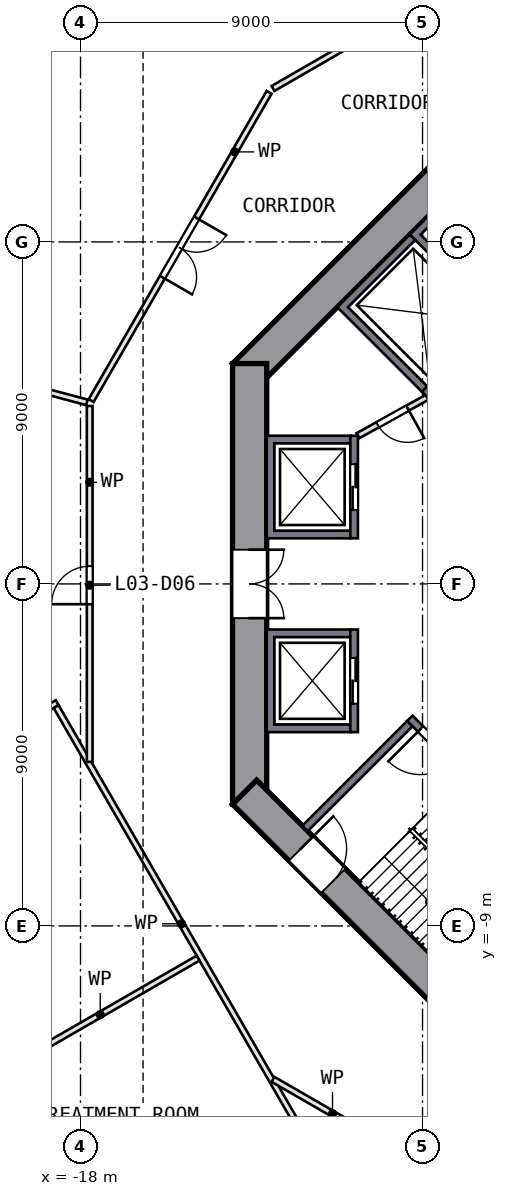
"""IFC4 building model, lengths in metres.
Left out: names, types, materials, properties, quantities, classifications, styles, units other than length and angle.
Written with IfcOpenShell. Run it as: python <this file> out.ifc"""

import sys

from ifc_helpers import new_model, si_unit, direction, frame, frame_2d, origin, place, context, subcontext, project, spatial, polyline, rectangle, outline, extrude, element, fill, save


model = new_model("IFC4")
c1 = context("Model", 3, precision=1e-05, world=origin(), true_north=direction((0.0, 1.0)))
c2 = subcontext(c1, "Body", "Model", "MODEL_VIEW")
j1 = project(units=[si_unit("LENGTHUNIT", "METRE"), si_unit("PLANEANGLEUNIT", "RADIAN")], contexts=[c1])
p1 = place(None, origin())
s1 = spatial("IfcSite", under=j1, at=p1, CompositionType="ELEMENT")
p2 = place(p1, origin())
s2 = spatial("IfcBuilding", under=s1, at=p2, CompositionType="ELEMENT")
p3 = place(p2, frame((0.0, 0.0, 19.0)))
s3 = spatial("IfcBuildingStorey", under=s2, at=p3, CompositionType="ELEMENT", Elevation=19.0)
p4 = place(p3, frame((-5.481, 13.682, 0.0), z_axis=(0.0, 0.0, 1.0), x_axis=(-0.707106781, -0.707106781, 0.0)))
e1 = element("IfcWall", 1, at=p4, inside=s3, PredefinedType="SHEAR", context=c2, shape_type="SweptSolid", body=[
    extrude(rectangle(XDim=11.598, YDim=0.9, at=frame_2d((5.799, 0.0))), origin(), (0.0, 0.0, 1.0), 4.5),
])
p5 = place(p3, frame((-13.55, 5.799, 0.0), z_axis=(0.0, 0.0, 1.0), x_axis=(0.0, -1.0, 0.0)))
e2 = element("IfcWall", 2, at=p5, inside=s3, PredefinedType="SHEAR", context=c2, shape_type="SweptSolid", body=[
    extrude(rectangle(XDim=11.598, YDim=0.9, at=frame_2d((5.799, 0.0))), origin(), (0.0, 0.0, 1.0), 4.5),
])
p6 = place(p5, frame((4.899, 0.0, 0.0)))
e3 = element("IfcOpeningElement", 3, at=p6, cuts=e2, PredefinedType="OPENING", context=c2, shape_type="SweptSolid", body=[
    extrude(rectangle(XDim=1.8, YDim=2.1, at=frame_2d((0.9, 1.05))), frame((0.0, 0.46, 0.0), z_axis=(0.0, -1.0, 0.0), x_axis=(1.0, 0.0, 0.0)), (0.0, 0.0, 1.0), 0.92),
])
p7 = place(p3, frame((-13.682, -5.481, 0.0), z_axis=(0.0, 0.0, 1.0), x_axis=(0.707106781, -0.707106781, 0.0)))
e4 = element("IfcWall", 4, at=p7, inside=s3, PredefinedType="SHEAR", context=c2, shape_type="SweptSolid", body=[
    extrude(rectangle(XDim=11.598, YDim=0.9, at=frame_2d((5.799, 0.0))), origin(), (0.0, 0.0, 1.0), 4.5),
])
p8 = place(p7, frame((2.099, 0.0, 0.0)))
e5 = element("IfcOpeningElement", 5, at=p8, cuts=e4, PredefinedType="OPENING", context=c2, shape_type="SweptSolid", body=[
    extrude(rectangle(XDim=1.2, YDim=2.1, at=frame_2d((0.6, 1.05))), frame((0.0, 0.46, 0.0), z_axis=(0.0, -1.0, 0.0), x_axis=(1.0, 0.0, 0.0)), (0.0, 0.0, 1.0), 0.92),
])
p9 = place(p3, frame((-17.777, 17.586, 0.0), z_axis=(0.0, 0.0, 1.0), x_axis=(-0.500006139, -0.866021859, 0.0)))
e6 = element("IfcWall", 6, at=p9, inside=s3, PredefinedType="SOLIDWALL", context=c2, shape_type="SweptSolid", body=[
    extrude(rectangle(XDim=12.962, YDim=0.14, at=frame_2d((6.481, 0.0))), origin(), (0.0, 0.0, 1.0), 4.05),
])
p10 = place(p9, frame((1.748, 0.0, 0.9)))
e7 = element("IfcOpeningElement", 7, at=p10, cuts=e6, PredefinedType="OPENING", context=c2, shape_type="SweptSolid", body=[
    extrude(rectangle(XDim=3.0, YDim=2.4, at=frame_2d((1.5, 1.2))), frame((0.0, 0.08, 0.0), z_axis=(0.0, -1.0, 0.0), x_axis=(1.0, 0.0, 0.0)), (0.0, 0.0, 1.0), 0.16),
])
p11 = place(p9, frame((7.935, 0.0, 0.9)))
e8 = element("IfcOpeningElement", 8, at=p11, cuts=e6, PredefinedType="OPENING", context=c2, shape_type="SweptSolid", body=[
    extrude(rectangle(XDim=3.0, YDim=2.4, at=frame_2d((1.5, 1.2))), frame((0.0, 0.08, 0.0), z_axis=(0.0, -1.0, 0.0), x_axis=(1.0, 0.0, 0.0)), (0.0, 0.0, 1.0), 0.16),
])
p12 = place(p3, origin())
e9 = element("IfcWall", 9, at=p12, inside=s3, PredefinedType="SOLIDWALL", context=c2, shape_type="SweptSolid", body=[
    extrude(outline(polyline([(-13.1, 3.9), (-10.9, 3.9), (-10.9, 3.7), (-12.9, 3.7), (-12.9, 1.4), (-10.9, 1.4), (-10.9, 1.2), (-13.1, 1.2), (-13.1, 3.9)])), origin(), (0.0, 0.0, 1.0), 4.05),
])
p13 = place(p3, frame((-10.8, 1.2, 0.0), z_axis=(0.0, 0.0, 1.0), x_axis=(0.0, 1.0, 0.0)))
e10 = element("IfcWall", 10, at=p13, inside=s3, PredefinedType="SOLIDWALL", context=c2, shape_type="SweptSolid", body=[
    extrude(rectangle(XDim=2.7, YDim=0.2, at=frame_2d((1.35, 0.0))), origin(), (0.0, 0.0, 1.0), 4.05),
])
p14 = place(p13, frame((0.75, 0.0, 0.0)))
e11 = element("IfcOpeningElement", 11, at=p14, cuts=e10, PredefinedType="OPENING", context=c2, shape_type="SweptSolid", body=[
    extrude(rectangle(XDim=1.2, YDim=2.1, at=frame_2d((0.6, 1.05))), frame((0.0, 0.11, 0.0), z_axis=(0.0, -1.0, 0.0), x_axis=(1.0, 0.0, 0.0)), (0.0, 0.0, 1.0), 0.22),
])
p15 = place(p3, origin())
e12 = element("IfcWall", 12, at=p15, inside=s3, PredefinedType="SOLIDWALL", context=c2, shape_type="SweptSolid", body=[
    extrude(outline(polyline([(-13.1, -3.9), (-13.1, -1.2), (-10.9, -1.2), (-10.9, -1.4), (-12.9, -1.4), (-12.9, -3.7), (-10.9, -3.7), (-10.9, -3.9), (-13.1, -3.9)])), origin(), (0.0, 0.0, 1.0), 4.05),
])
p16 = place(p3, frame((-10.8, -1.2, 0.0), z_axis=(0.0, 0.0, 1.0), x_axis=(0.0, -1.0, 0.0)))
e13 = element("IfcWall", 13, at=p16, inside=s3, PredefinedType="SOLIDWALL", context=c2, shape_type="SweptSolid", body=[
    extrude(rectangle(XDim=2.7, YDim=0.2, at=frame_2d((1.35, 0.0))), origin(), (0.0, 0.0, 1.0), 4.05),
])
p17 = place(p16, frame((0.75, 0.0, 0.0)))
e14 = element("IfcOpeningElement", 14, at=p17, cuts=e13, PredefinedType="OPENING", context=c2, shape_type="SweptSolid", body=[
    extrude(rectangle(XDim=1.2, YDim=2.1, at=frame_2d((0.6, 1.05))), frame((0.0, 0.11, 0.0), z_axis=(0.0, -1.0, 0.0), x_axis=(1.0, 0.0, 0.0)), (0.0, 0.0, 1.0), 0.22),
])
p18 = place(p3, origin())
e15 = element("IfcWall", 15, at=p18, inside=s3, PredefinedType="SOLIDWALL", context=c2, shape_type="SweptSolid", body=[
    extrude(outline(polyline([(-9.334, 9.192), (-7.283, 11.243), (-5.056, 9.016), (-5.197, 8.874), (-7.283, 10.96), (-9.051, 9.192), (-6.965, 7.106), (-7.106, 6.965), (-9.334, 9.192)])), origin(), (0.0, 0.0, 1.0), 4.05),
])
p19 = place(p3, origin())
e16 = element("IfcWall", 16, at=p19, inside=s3, PredefinedType="SOLIDWALL", context=c2, shape_type="SweptSolid", body=[
    extrude(outline(polyline([(-11.243, 7.283), (-9.334, 9.192), (-9.192, 9.051), (-10.96, 7.283), (-8.874, 5.197), (-9.016, 5.056), (-11.243, 7.283)])), origin(), (0.0, 0.0, 1.0), 4.05),
])
p20 = place(p3, frame((-7.036, 6.894, 0.0), z_axis=(0.0, 0.0, 1.0), x_axis=(-0.707106781, -0.707106781, 0.0)))
e17 = element("IfcWall", 17, at=p20, inside=s3, PredefinedType="SOLIDWALL", context=c2, shape_type="SweptSolid", body=[
    extrude(rectangle(XDim=2.7, YDim=0.2, at=frame_2d((1.35, 0.0))), origin(), (0.0, 0.0, 1.0), 4.05),
])
p21 = place(p20, frame((0.65, 0.0, 0.0)))
e18 = element("IfcOpeningElement", 18, at=p21, cuts=e17, PredefinedType="OPENING", context=c2, shape_type="SweptSolid", body=[
    extrude(rectangle(XDim=1.2, YDim=2.1, at=frame_2d((0.6, 1.05))), frame((0.0, 0.11, 0.0), z_axis=(0.0, -1.0, 0.0), x_axis=(1.0, 0.0, 0.0)), (0.0, 0.0, 1.0), 0.22),
])
p22 = place(p3, frame((-3.535, -9.334, 0.0), z_axis=(0.0, 0.0, 1.0), x_axis=(-0.707106781, 0.707106781, 0.0)))
e19 = element("IfcWall", 19, at=p22, inside=s3, PredefinedType="SOLIDWALL", context=c2, shape_type="SweptSolid", body=[
    extrude(rectangle(XDim=8.2, YDim=0.2, at=frame_2d((4.1, 0.0))), origin(), (0.0, 0.0, 1.0), 4.05),
])
p23 = place(p22, frame((6.6, 0.0, 0.0)))
e20 = element("IfcOpeningElement", 20, at=p23, cuts=e19, PredefinedType="OPENING", context=c2, shape_type="SweptSolid", body=[
    extrude(rectangle(XDim=1.2, YDim=2.1, at=frame_2d((0.6, 1.05))), frame((0.0, 0.11, 0.0), z_axis=(0.0, -1.0, 0.0), x_axis=(1.0, 0.0, 0.0)), (0.0, 0.0, 1.0), 0.22),
])
p24 = place(p3, frame((-9.334, -3.677, 0.0), z_axis=(0.0, 0.0, 1.0), x_axis=(-0.707106781, -0.707106781, 0.0)))
e21 = element("IfcWall", 21, at=p24, inside=s3, PredefinedType="SOLIDWALL", context=c2, shape_type="SweptSolid", body=[
    extrude(rectangle(XDim=3.9, YDim=0.2, at=frame_2d((1.95, 0.0))), origin(), (0.0, 0.0, 1.0), 4.05),
])
p25 = place(p3, frame((-8.874, 4.914, 0.0), z_axis=(0.0, 0.0, 1.0), x_axis=(-0.874129705, -0.485692555, 0.0)))
e22 = element("IfcWall", 22, at=p25, inside=s3, PredefinedType="PARTITIONING", context=c2, shape_type="SweptSolid", body=[
    extrude(rectangle(XDim=2.089, YDim=0.15, at=frame_2d((1.044, 0.0))), origin(), (0.0, 0.0, 1.0), 4.05),
])
p26 = place(p25, frame((0.594, 0.0, 0.0)))
e23 = element("IfcOpeningElement", 23, at=p26, cuts=e22, PredefinedType="OPENING", context=c2, shape_type="SweptSolid", body=[
    extrude(rectangle(XDim=0.9, YDim=2.1, at=frame_2d((0.45, 1.05))), frame((0.0, 0.085, 0.0), z_axis=(0.0, -1.0, 0.0), x_axis=(1.0, 0.0, 0.0)), (0.0, 0.0, 1.0), 0.17),
])
p27 = place(p3, frame((-22.965, 6.153, 0.0), z_axis=(0.0, 0.0, 1.0), x_axis=(0.965919345, -0.258843233, 0.0)))
e24 = element("IfcWall", 24, at=p27, inside=s3, PredefinedType="PARTITIONING", context=c2, shape_type="SweptSolid", body=[
    extrude(rectangle(XDim=5.315, YDim=0.15, at=frame_2d((2.657, 0.0))), origin(), (0.0, 0.0, 1.0), 4.05),
])
p28 = place(p3, frame((-18.614, -3.126, 0.0), z_axis=(0.0, 0.0, 1.0), x_axis=(-0.866030255, -0.499991598, 0.0)))
e25 = element("IfcWall", 25, at=p28, inside=s3, PredefinedType="PARTITIONING", context=c2, shape_type="SweptSolid", body=[
    extrude(rectangle(XDim=5.732, YDim=0.15, at=frame_2d((2.866, 0.0))), origin(), (0.0, 0.0, 1.0), 4.05),
])
p29 = place(p3, frame((-18.642, -3.228, 0.0), z_axis=(0.0, 0.0, 1.0), x_axis=(0.499988223, -0.866032203, 0.0)))
e26 = element("IfcWall", 26, at=p29, inside=s3, PredefinedType="PARTITIONING", context=c2, shape_type="SweptSolid", body=[
    extrude(rectangle(XDim=13.2, YDim=0.15, at=frame_2d((6.6, 0.0))), origin(), (0.0, 0.0, 1.0), 4.05),
])
p30 = place(p3, frame((-17.758, -4.683, 0.0), z_axis=(0.0, 0.0, 1.0), x_axis=(0.0, 1.0, 0.0)))
e27 = element("IfcWall", 27, at=p30, inside=s3, PredefinedType="PARTITIONING", context=c2, shape_type="SweptSolid", body=[
    extrude(rectangle(XDim=9.367, YDim=0.15, at=frame_2d((4.683, 0.0))), origin(), (0.0, 0.0, 1.0), 4.05),
])
p31 = place(p30, frame((4.15, 0.0, 0.0)))
e28 = element("IfcOpeningElement", 28, at=p31, cuts=e27, PredefinedType="OPENING", context=c2, shape_type="SweptSolid", body=[
    extrude(rectangle(XDim=1.0, YDim=2.1, at=frame_2d((0.5, 1.05))), frame((0.0, 0.085, 0.0), z_axis=(0.0, -1.0, 0.0), x_axis=(1.0, 0.0, 0.0)), (0.0, 0.0, 1.0), 0.17),
])
p32 = place(p3, frame((-13.038, 12.935, 0.0), z_axis=(0.0, 0.0, 1.0), x_axis=(-0.499979668, -0.866037142, 0.0)))
e29 = element("IfcWall", 29, at=p32, inside=s3, PredefinedType="PARTITIONING", context=c2, shape_type="SweptSolid", body=[
    extrude(rectangle(XDim=9.367, YDim=0.15, at=frame_2d((4.683, 0.0))), origin(), (0.0, 0.0, 1.0), 4.05),
])
p33 = place(p32, frame((3.817, 0.0, 0.0)))
e30 = element("IfcOpeningElement", 30, at=p33, cuts=e29, PredefinedType="OPENING", context=c2, shape_type="SweptSolid", body=[
    extrude(rectangle(XDim=1.8, YDim=2.1, at=frame_2d((0.9, 1.05))), frame((0.0, 0.085, 0.0), z_axis=(0.0, -1.0, 0.0), x_axis=(1.0, 0.0, 0.0)), (0.0, 0.0, 1.0), 0.17),
])
p34 = place(p3, frame((-14.906, -9.848, 0.0), z_axis=(0.0, 0.0, 1.0), x_axis=(-0.866038559, -0.499977214, 0.0)))
e31 = element("IfcWall", 31, at=p34, inside=s3, PredefinedType="PARTITIONING", context=c2, shape_type="SweptSolid", body=[
    extrude(rectangle(XDim=5.945, YDim=0.15, at=frame_2d((2.973, 0.0))), origin(), (0.0, 0.0, 1.0), 4.05),
])
p35 = place(p3, frame((-4.823, 17.721, 0.0), z_axis=(0.0, 0.0, 1.0), x_axis=(-0.866037142, -0.499979668, 0.0)))
e32 = element("IfcWall", 32, at=p35, inside=s3, PredefinedType="PARTITIONING", context=c2, shape_type="SweptSolid", body=[
    extrude(rectangle(XDim=9.367, YDim=0.15, at=frame_2d((4.683, 0.0))), origin(), (0.0, 0.0, 1.0), 4.05),
])
p36 = place(p35, frame((3.817, 0.0, 0.0)))
e33 = element("IfcOpeningElement", 33, at=p36, cuts=e32, PredefinedType="OPENING", context=c2, shape_type="SweptSolid", body=[
    extrude(rectangle(XDim=1.8, YDim=2.1, at=frame_2d((0.9, 1.05))), frame((0.0, 0.085, 0.0), z_axis=(0.0, -1.0, 0.0), x_axis=(1.0, 0.0, 0.0)), (0.0, 0.0, 1.0), 0.17),
])
p37 = place(p3, frame((-4.823, -17.721, 0.0), z_axis=(0.0, 0.0, 1.0), x_axis=(-0.866037142, 0.499979668, 0.0)))
e34 = element("IfcWall", 34, at=p37, inside=s3, PredefinedType="PARTITIONING", context=c2, shape_type="SweptSolid", body=[
    extrude(rectangle(XDim=9.367, YDim=0.15, at=frame_2d((4.683, 0.0))), origin(), (0.0, 0.0, 1.0), 4.05),
])
p38 = place(p37, frame((3.75, 0.0, 0.0)))
e35 = element("IfcOpeningElement", 35, at=p38, cuts=e34, PredefinedType="OPENING", context=c2, shape_type="SweptSolid", body=[
    extrude(rectangle(XDim=1.8, YDim=2.1, at=frame_2d((0.9, 1.05))), frame((0.0, 0.085, 0.0), z_axis=(0.0, -1.0, 0.0), x_axis=(1.0, 0.0, 0.0)), (0.0, 0.0, 1.0), 0.17),
])
p39 = place(p10, origin())
e36 = element("IfcWindow", 36, at=p39, inside=s3, PartitioningType="SINGLE_PANEL", PredefinedType="WINDOW", context=c2, shape_type="SweptSolid", body=[
    extrude(rectangle(XDim=3.0, YDim=2.4, at=frame_2d((1.5, 1.2))), frame((0.0, 0.03, 0.0), z_axis=(0.0, -1.0, 0.0), x_axis=(1.0, 0.0, 0.0)), (0.0, 0.0, 1.0), 0.06),
])
fill(e7, e36)
p40 = place(p14, origin())
e37 = element("IfcDoor", 37, at=p40, inside=s3, OperationType="DOUBLE_DOOR_SLIDING", PredefinedType="DOOR", context=c2, shape_type="SweptSolid", body=[
    extrude(rectangle(XDim=1.2, YDim=2.1, at=frame_2d((0.6, 1.05))), frame((0.0, 0.025, 0.0), z_axis=(0.0, -1.0, 0.0), x_axis=(1.0, 0.0, 0.0)), (0.0, 0.0, 1.0), 0.05),
])
fill(e11, e37)
p41 = place(p17, origin())
e38 = element("IfcDoor", 38, at=p41, inside=s3, OperationType="DOUBLE_DOOR_SLIDING", PredefinedType="DOOR", context=c2, shape_type="SweptSolid", body=[
    extrude(rectangle(XDim=1.2, YDim=2.1, at=frame_2d((0.6, 1.05))), frame((0.0, 0.025, 0.0), z_axis=(0.0, -1.0, 0.0), x_axis=(1.0, 0.0, 0.0)), (0.0, 0.0, 1.0), 0.05),
])
fill(e14, e38)
p42 = place(p23, origin())
e39 = element("IfcDoor", 39, at=p42, inside=s3, OperationType="SINGLE_SWING_RIGHT", PredefinedType="DOOR", context=c2, shape_type="SweptSolid", body=[
    extrude(rectangle(XDim=1.2, YDim=2.1, at=frame_2d((0.6, 1.05))), frame((0.0, 0.025, 0.0), z_axis=(0.0, -1.0, 0.0), x_axis=(1.0, 0.0, 0.0)), (0.0, 0.0, 1.0), 0.05),
])
fill(e20, e39)
p43 = place(p6, origin())
e40 = element("IfcDoor", 40, at=p43, inside=s3, OperationType="DOUBLE_DOOR_SINGLE_SWING", PredefinedType="DOOR", context=c2, shape_type="SweptSolid", body=[
    extrude(rectangle(XDim=1.8, YDim=2.1, at=frame_2d((0.9, 1.05))), frame((0.0, 0.025, 0.0), z_axis=(0.0, -1.0, 0.0), x_axis=(1.0, 0.0, 0.0)), (0.0, 0.0, 1.0), 0.05),
])
fill(e3, e40)
p44 = place(p8, origin())
e41 = element("IfcDoor", 41, at=p44, inside=s3, OperationType="SINGLE_SWING_LEFT", PredefinedType="DOOR", context=c2, shape_type="SweptSolid", body=[
    extrude(rectangle(XDim=1.2, YDim=2.1, at=frame_2d((0.6, 1.05))), frame((0.0, 0.025, 0.0), z_axis=(0.0, -1.0, 0.0), x_axis=(1.0, 0.0, 0.0)), (0.0, 0.0, 1.0), 0.05),
])
fill(e5, e41)
p45 = place(p26, origin())
e42 = element("IfcDoor", 42, at=p45, inside=s3, OperationType="SINGLE_SWING_LEFT", PredefinedType="DOOR", context=c2, shape_type="SweptSolid", body=[
    extrude(rectangle(XDim=0.9, YDim=2.1, at=frame_2d((0.45, 1.05))), frame((0.0, 0.025, 0.0), z_axis=(0.0, -1.0, 0.0), x_axis=(1.0, 0.0, 0.0)), (0.0, 0.0, 1.0), 0.05),
])
fill(e23, e42)
p46 = place(p31, origin())
e43 = element("IfcDoor", 43, at=p46, inside=s3, OperationType="SINGLE_SWING_LEFT", PredefinedType="DOOR", context=c2, shape_type="SweptSolid", body=[
    extrude(rectangle(XDim=1.0, YDim=2.1, at=frame_2d((0.5, 1.05))), frame((0.0, 0.025, 0.0), z_axis=(0.0, -1.0, 0.0), x_axis=(1.0, 0.0, 0.0)), (0.0, 0.0, 1.0), 0.05),
])
fill(e28, e43)
p47 = place(p33, origin())
e44 = element("IfcDoor", 44, at=p47, inside=s3, OperationType="DOUBLE_DOOR_SINGLE_SWING", PredefinedType="DOOR", context=c2, shape_type="SweptSolid", body=[
    extrude(rectangle(XDim=1.8, YDim=2.1, at=frame_2d((0.9, 1.05))), frame((0.0, 0.025, 0.0), z_axis=(0.0, -1.0, 0.0), x_axis=(1.0, 0.0, 0.0)), (0.0, 0.0, 1.0), 0.05),
])
fill(e30, e44)
save(model, sys.argv[1])
